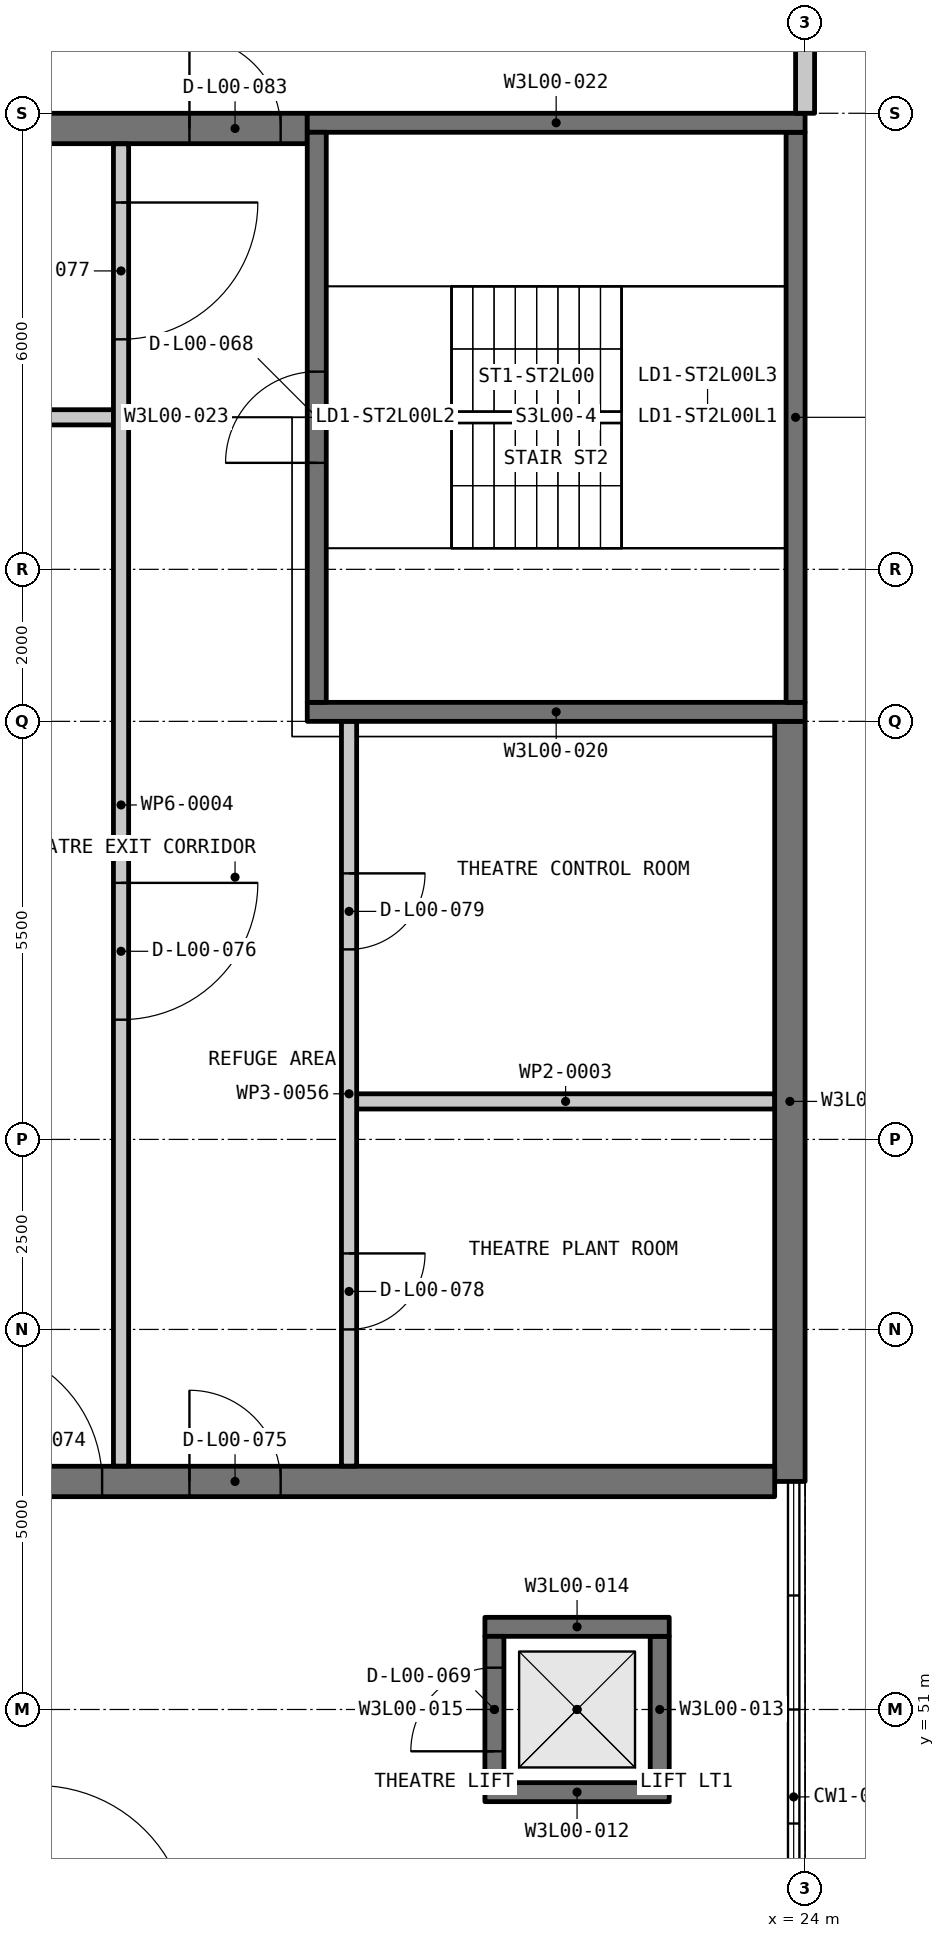
"""IFC4 building model, lengths in metres.
Left out: names, types, materials, properties, quantities, classifications, styles, units other than length and angle.
Written with IfcOpenShell. Run it as: python <this file> out.ifc"""

import sys

from ifc_helpers import new_model, si_unit, direction, frame, frame_2d, origin, place, context, subcontext, project, spatial, rectangle, extrude, element, fill, save


model = new_model("IFC4")
c1 = context("Model", 3, precision=1e-05, world=origin(), true_north=direction((0.0, 1.0)))
c2 = subcontext(c1, "Body", "Model", "MODEL_VIEW")
j1 = project(units=[si_unit("LENGTHUNIT", "METRE"), si_unit("PLANEANGLEUNIT", "RADIAN")], contexts=[c1])
p1 = place(None, origin())
s1 = spatial("IfcSite", under=j1, at=p1, CompositionType="ELEMENT")
p2 = place(p1, origin())
s2 = spatial("IfcBuilding", under=s1, at=p2, CompositionType="ELEMENT")
p3 = place(p2, origin())
s3 = spatial("IfcBuildingStorey", under=s2, at=p3, CompositionType="ELEMENT", Elevation=0.0)
p4 = place(p3, frame((23.8, 54.0, -0.2), z_axis=(0.0, 0.0, 1.0), x_axis=(0.0, 1.0, 0.0)))
e1 = element("IfcWall", 1, at=p4, inside=s3, PredefinedType="SOLIDWALL", context=c2, shape_type="SweptSolid", body=[
    extrude(rectangle(XDim=10.0, YDim=0.4, at=frame_2d((5.0, 0.0))), origin(), (0.0, 0.0, 1.0), 5.9),
])
p5 = place(p3, frame((0.4, 71.8, -0.2), z_axis=(0.0, 0.0, 1.0), x_axis=(1.0, 0.0, 0.0)))
e2 = element("IfcWall", 2, at=p5, inside=s3, PredefinedType="SOLIDWALL", context=c2, shape_type="SweptSolid", body=[
    extrude(rectangle(XDim=17.05, YDim=0.4, at=frame_2d((8.525, 0.0))), origin(), (0.0, 0.0, 1.0), 5.9),
])
p6 = place(p5, frame((15.5, 0.0, 0.2)))
e3 = element("IfcOpeningElement", 3, at=p6, cuts=e2, PredefinedType="OPENING", context=c2, shape_type="SweptSolid", body=[
    extrude(rectangle(XDim=1.2, YDim=2.2, at=frame_2d((0.6, 1.1))), frame((0.0, 0.21, 0.0), z_axis=(0.0, -1.0, 0.0), x_axis=(1.0, 0.0, 0.0)), (0.0, 0.0, 1.0), 0.42),
])
p7 = place(p5, frame((5.7, 0.0, 0.2)))
e4 = element("IfcOpeningElement", 4, at=p7, cuts=e2, PredefinedType="OPENING", context=c2, shape_type="SweptSolid", body=[
    extrude(rectangle(XDim=1.8, YDim=2.2, at=frame_2d((0.9, 1.1))), frame((0.0, 0.21, 0.0), z_axis=(0.0, -1.0, 0.0), x_axis=(1.0, 0.0, 0.0)), (0.0, 0.0, 1.0), 0.42),
])
p8 = place(p3, frame((0.4, 54.0, -0.2), z_axis=(0.0, 0.0, 1.0), x_axis=(1.0, 0.0, 0.0)))
e5 = element("IfcWall", 5, at=p8, inside=s3, PredefinedType="SOLIDWALL", context=c2, shape_type="SweptSolid", body=[
    extrude(rectangle(XDim=23.2, YDim=0.4, at=frame_2d((11.6, 0.0))), origin(), (0.0, 0.0, 1.0), 5.9),
])
p9 = place(p8, frame((9.049, 0.0, 0.2)))
e6 = element("IfcOpeningElement", 6, at=p9, cuts=e5, PredefinedType="OPENING", context=c2, shape_type="SweptSolid", body=[
    extrude(rectangle(XDim=1.8, YDim=2.1, at=frame_2d((0.9, 1.05))), frame((0.0, 0.21, 0.0), z_axis=(0.0, -1.0, 0.0), x_axis=(1.0, 0.0, 0.0)), (0.0, 0.0, 1.0), 0.42),
])
p10 = place(p8, frame((12.551, 0.0, 0.2)))
e7 = element("IfcOpeningElement", 7, at=p10, cuts=e5, PredefinedType="OPENING", context=c2, shape_type="SweptSolid", body=[
    extrude(rectangle(XDim=1.8, YDim=2.1, at=frame_2d((0.9, 1.05))), frame((0.0, 0.21, 0.0), z_axis=(0.0, -1.0, 0.0), x_axis=(1.0, 0.0, 0.0)), (0.0, 0.0, 1.0), 0.42),
])
p11 = place(p8, frame((15.5, 0.0, 0.2)))
e8 = element("IfcOpeningElement", 8, at=p11, cuts=e5, PredefinedType="OPENING", context=c2, shape_type="SweptSolid", body=[
    extrude(rectangle(XDim=1.2, YDim=2.1, at=frame_2d((0.6, 1.05))), frame((0.0, 0.21, 0.0), z_axis=(0.0, -1.0, 0.0), x_axis=(1.0, 0.0, 0.0)), (0.0, 0.0, 1.0), 0.42),
])
p12 = place(p3, frame((19.788, 49.913, -1.4), z_axis=(0.0, 0.0, 1.0), x_axis=(1.0, 0.0, 0.0)))
e9 = element("IfcWall", 9, at=p12, inside=s3, PredefinedType="SHEAR", context=c2, shape_type="SweptSolid", body=[
    extrude(rectangle(XDim=2.425, YDim=0.25, at=frame_2d((1.212, 0.0))), origin(), (0.0, 0.0, 1.0), 7.1),
])
p13 = place(p3, frame((22.087, 50.038, -1.4), z_axis=(0.0, 0.0, 1.0), x_axis=(0.0, 1.0, 0.0)))
e10 = element("IfcWall", 10, at=p13, inside=s3, PredefinedType="SHEAR", context=c2, shape_type="SweptSolid", body=[
    extrude(rectangle(XDim=1.925, YDim=0.25, at=frame_2d((0.962, 0.0))), origin(), (0.0, 0.0, 1.0), 7.1),
])
p14 = place(p3, frame((19.788, 52.087, -1.4), z_axis=(0.0, 0.0, 1.0), x_axis=(1.0, 0.0, 0.0)))
e11 = element("IfcWall", 11, at=p14, inside=s3, PredefinedType="SHEAR", context=c2, shape_type="SweptSolid", body=[
    extrude(rectangle(XDim=2.425, YDim=0.25, at=frame_2d((1.212, 0.0))), origin(), (0.0, 0.0, 1.0), 7.1),
])
p15 = place(p3, frame((19.913, 50.038, -1.4), z_axis=(0.0, 0.0, 1.0), x_axis=(0.0, 1.0, 0.0)))
e12 = element("IfcWall", 12, at=p15, inside=s3, PredefinedType="SHEAR", context=c2, shape_type="SweptSolid", body=[
    extrude(rectangle(XDim=1.925, YDim=0.25, at=frame_2d((0.962, 0.0))), origin(), (0.0, 0.0, 1.0), 7.1),
])
p16 = place(p15, frame((0.413, 0.0, 1.4)))
e13 = element("IfcOpeningElement", 13, at=p16, cuts=e12, PredefinedType="OPENING", context=c2, shape_type="SweptSolid", body=[
    extrude(rectangle(XDim=1.1, YDim=2.1, at=frame_2d((0.55, 1.05))), frame((0.0, 0.135, 0.0), z_axis=(0.0, -1.0, 0.0), x_axis=(1.0, 0.0, 0.0)), (0.0, 0.0, 1.0), 0.27),
])
p17 = place(p3, frame((17.45, 64.125, -0.2), z_axis=(0.0, 0.0, 1.0), x_axis=(1.0, 0.0, 0.0)))
e14 = element("IfcWall", 14, at=p17, inside=s3, PredefinedType="SHEAR", context=c2, shape_type="SweptSolid", body=[
    extrude(rectangle(XDim=6.55, YDim=0.25, at=frame_2d((3.275, 0.0))), origin(), (0.0, 0.0, 1.0), 5.9),
])
p18 = place(p3, frame((23.875, 64.25, -0.2), z_axis=(0.0, 0.0, 1.0), x_axis=(0.0, 1.0, 0.0)))
e15 = element("IfcWall", 15, at=p18, inside=s3, PredefinedType="SHEAR", context=c2, shape_type="SweptSolid", body=[
    extrude(rectangle(XDim=7.5, YDim=0.25, at=frame_2d((3.75, 0.0))), origin(), (0.0, 0.0, 1.0), 5.9),
])
p19 = place(p3, frame((17.45, 71.875, -0.2), z_axis=(0.0, 0.0, 1.0), x_axis=(1.0, 0.0, 0.0)))
e16 = element("IfcWall", 16, at=p19, inside=s3, PredefinedType="SHEAR", context=c2, shape_type="SweptSolid", body=[
    extrude(rectangle(XDim=6.55, YDim=0.25, at=frame_2d((3.275, 0.0))), origin(), (0.0, 0.0, 1.0), 5.9),
])
p20 = place(p3, frame((17.575, 64.25, -0.2), z_axis=(0.0, 0.0, 1.0), x_axis=(0.0, 1.0, 0.0)))
e17 = element("IfcWall", 17, at=p20, inside=s3, PredefinedType="SHEAR", context=c2, shape_type="SweptSolid", body=[
    extrude(rectangle(XDim=7.5, YDim=0.25, at=frame_2d((3.75, 0.0))), origin(), (0.0, 0.0, 1.0), 5.9),
])
p21 = place(p20, frame((3.151, 0.0, 0.2)))
e18 = element("IfcOpeningElement", 18, at=p21, cuts=e17, PredefinedType="OPENING", context=c2, shape_type="SweptSolid", body=[
    extrude(rectangle(XDim=1.2, YDim=2.2, at=frame_2d((0.6, 1.1))), frame((0.0, 0.135, 0.0), z_axis=(0.0, -1.0, 0.0), x_axis=(1.0, 0.0, 0.0)), (0.0, 0.0, 1.0), 0.27),
])
p22 = place(p3, frame((24.0, 72.0, 0.0), z_axis=(0.0, 0.0, 1.0), x_axis=(0.0, 1.0, 0.0)))
e19 = element("IfcWall", 19, at=p22, inside=s3, PredefinedType="SOLIDWALL", context=c2, shape_type="SweptSolid", body=[
    extrude(rectangle(XDim=3.3, YDim=0.25, at=frame_2d((1.65, 0.0))), origin(), (0.0, 0.0, 1.0), 4.5),
])
p23 = place(p3, frame((18.1, 59.0, 0.0), z_axis=(0.0, 0.0, 1.0), x_axis=(1.0, 0.0, 0.0)))
e20 = element("IfcWall", 20, at=p23, inside=s3, PredefinedType="PARTITIONING", context=c2, shape_type="SweptSolid", body=[
    extrude(rectangle(XDim=5.498, YDim=0.2, at=frame_2d((2.749, 0.0))), origin(), (0.0, 0.0, 1.0), 2.374),
])
p24 = place(p3, frame((0.402, 68.0, 0.0), z_axis=(0.0, 0.0, 1.0), x_axis=(1.0, 0.0, 0.0)))
e21 = element("IfcWall", 21, at=p24, inside=s3, PredefinedType="PARTITIONING", context=c2, shape_type="SweptSolid", body=[
    extrude(rectangle(XDim=14.498, YDim=0.2, at=frame_2d((7.249, 0.0))), origin(), (0.0, 0.0, 1.0), 12.738),
])
p25 = place(p24, frame((6.598, 0.0, 0.0)))
e22 = element("IfcOpeningElement", 22, at=p25, cuts=e21, PredefinedType="OPENING", context=c2, shape_type="SweptSolid", body=[
    extrude(rectangle(XDim=1.2, YDim=2.1, at=frame_2d((0.6, 1.05))), frame((0.0, 0.11, 0.0), z_axis=(0.0, -1.0, 0.0), x_axis=(1.0, 0.0, 0.0)), (0.0, 0.0, 1.0), 0.22),
])
p26 = place(p3, frame((18.0, 63.998, 0.0), z_axis=(0.0, 0.0, 1.0), x_axis=(0.0, -1.0, 0.0)))
e23 = element("IfcWall", 23, at=p26, inside=s3, PredefinedType="PARTITIONING", context=c2, shape_type="SweptSolid", body=[
    extrude(rectangle(XDim=9.796, YDim=0.2, at=frame_2d((4.898, 0.0))), origin(), (0.0, 0.0, 1.0), 11.05),
])
p27 = place(p26, frame((6.998, 0.0, 0.0)))
e24 = element("IfcOpeningElement", 24, at=p27, cuts=e23, PredefinedType="OPENING", context=c2, shape_type="SweptSolid", body=[
    extrude(rectangle(XDim=1.0, YDim=2.1, at=frame_2d((0.5, 1.05))), frame((0.0, 0.11, 0.0), z_axis=(0.0, -1.0, 0.0), x_axis=(1.0, 0.0, 0.0)), (0.0, 0.0, 1.0), 0.22),
])
p28 = place(p26, frame((1.998, 0.0, 0.0)))
e25 = element("IfcOpeningElement", 25, at=p28, cuts=e23, PredefinedType="OPENING", context=c2, shape_type="SweptSolid", body=[
    extrude(rectangle(XDim=1.0, YDim=2.1, at=frame_2d((0.5, 1.05))), frame((0.0, 0.11, 0.0), z_axis=(0.0, -1.0, 0.0), x_axis=(1.0, 0.0, 0.0)), (0.0, 0.0, 1.0), 0.22),
])
p29 = place(p3, frame((15.0, 71.598, 0.0), z_axis=(0.0, 0.0, 1.0), x_axis=(0.0, -1.0, 0.0)))
e26 = element("IfcWall", 26, at=p29, inside=s3, PredefinedType="PARTITIONING", context=c2, shape_type="SweptSolid", body=[
    extrude(rectangle(XDim=17.396, YDim=0.2, at=frame_2d((8.698, 0.0))), origin(), (0.0, 0.0, 1.0), 12.175),
])
p30 = place(p29, frame((9.723, 0.0, 0.0)))
e27 = element("IfcOpeningElement", 27, at=p30, cuts=e26, PredefinedType="OPENING", context=c2, shape_type="SweptSolid", body=[
    extrude(rectangle(XDim=1.8, YDim=2.1, at=frame_2d((0.9, 1.05))), frame((0.0, 0.11, 0.0), z_axis=(0.0, -1.0, 0.0), x_axis=(1.0, 0.0, 0.0)), (0.0, 0.0, 1.0), 0.22),
])
p31 = place(p29, frame((0.772, 0.0, 0.0)))
e28 = element("IfcOpeningElement", 28, at=p31, cuts=e26, PredefinedType="OPENING", context=c2, shape_type="SweptSolid", body=[
    extrude(rectangle(XDim=1.8, YDim=2.1, at=frame_2d((0.9, 1.05))), frame((0.0, 0.11, 0.0), z_axis=(0.0, -1.0, 0.0), x_axis=(1.0, 0.0, 0.0)), (0.0, 0.0, 1.0), 0.22),
])
p32 = place(p6, origin())
e29 = element("IfcDoor", 29, at=p32, inside=s3, OperationType="SINGLE_SWING_LEFT", PredefinedType="DOOR", context=c2, shape_type="SweptSolid", body=[
    extrude(rectangle(XDim=1.2, YDim=2.2, at=frame_2d((0.6, 1.1))), frame((0.0, 0.025, 0.0), z_axis=(0.0, -1.0, 0.0), x_axis=(1.0, 0.0, 0.0)), (0.0, 0.0, 1.0), 0.05),
])
fill(e3, e29)
p33 = place(p21, origin())
e30 = element("IfcDoor", 30, at=p33, inside=s3, OperationType="SINGLE_SWING_RIGHT", PredefinedType="DOOR", context=c2, shape_type="SweptSolid", body=[
    extrude(rectangle(XDim=1.2, YDim=2.2, at=frame_2d((0.6, 1.1))), frame((0.0, 0.025, 0.0), z_axis=(0.0, -1.0, 0.0), x_axis=(1.0, 0.0, 0.0)), (0.0, 0.0, 1.0), 0.05),
])
fill(e18, e30)
p34 = place(p16, origin())
e31 = element("IfcDoor", 31, at=p34, inside=s3, OperationType="DOUBLE_DOOR_SLIDING", PredefinedType="DOOR", context=c2, shape_type="SweptSolid", body=[
    extrude(rectangle(XDim=1.1, YDim=2.1, at=frame_2d((0.55, 1.05))), frame((0.0, 0.025, 0.0), z_axis=(0.0, -1.0, 0.0), x_axis=(1.0, 0.0, 0.0)), (0.0, 0.0, 1.0), 0.05),
])
fill(e13, e31)
p35 = place(p10, origin())
e32 = element("IfcDoor", 32, at=p35, inside=s3, OperationType="DOUBLE_DOOR_SINGLE_SWING", PredefinedType="DOOR", context=c2, shape_type="SweptSolid", body=[
    extrude(rectangle(XDim=1.8, YDim=2.1, at=frame_2d((0.9, 1.05))), frame((0.0, 0.025, 0.0), z_axis=(0.0, -1.0, 0.0), x_axis=(1.0, 0.0, 0.0)), (0.0, 0.0, 1.0), 0.05),
])
fill(e7, e32)
p36 = place(p11, origin())
e33 = element("IfcDoor", 33, at=p36, inside=s3, OperationType="SINGLE_SWING_LEFT", PredefinedType="DOOR", context=c2, shape_type="SweptSolid", body=[
    extrude(rectangle(XDim=1.2, YDim=2.1, at=frame_2d((0.6, 1.05))), frame((0.0, 0.025, 0.0), z_axis=(0.0, -1.0, 0.0), x_axis=(1.0, 0.0, 0.0)), (0.0, 0.0, 1.0), 0.05),
])
fill(e8, e33)
p37 = place(p30, origin())
e34 = element("IfcDoor", 34, at=p37, inside=s3, OperationType="DOUBLE_DOOR_SINGLE_SWING", PredefinedType="DOOR", context=c2, shape_type="SweptSolid", body=[
    extrude(rectangle(XDim=1.8, YDim=2.1, at=frame_2d((0.9, 1.05))), frame((0.0, 0.025, 0.0), z_axis=(0.0, -1.0, 0.0), x_axis=(1.0, 0.0, 0.0)), (0.0, 0.0, 1.0), 0.05),
])
fill(e27, e34)
p38 = place(p31, origin())
e35 = element("IfcDoor", 35, at=p38, inside=s3, OperationType="DOUBLE_DOOR_SINGLE_SWING", PredefinedType="DOOR", context=c2, shape_type="SweptSolid", body=[
    extrude(rectangle(XDim=1.8, YDim=2.1, at=frame_2d((0.9, 1.05))), frame((0.0, 0.025, 0.0), z_axis=(0.0, -1.0, 0.0), x_axis=(1.0, 0.0, 0.0)), (0.0, 0.0, 1.0), 0.05),
])
fill(e28, e35)
p39 = place(p27, origin())
e36 = element("IfcDoor", 36, at=p39, inside=s3, OperationType="SINGLE_SWING_LEFT", PredefinedType="DOOR", context=c2, shape_type="SweptSolid", body=[
    extrude(rectangle(XDim=1.0, YDim=2.1, at=frame_2d((0.5, 1.05))), frame((0.0, 0.025, 0.0), z_axis=(0.0, -1.0, 0.0), x_axis=(1.0, 0.0, 0.0)), (0.0, 0.0, 1.0), 0.05),
])
fill(e24, e36)
p40 = place(p28, origin())
e37 = element("IfcDoor", 37, at=p40, inside=s3, OperationType="SINGLE_SWING_RIGHT", PredefinedType="DOOR", context=c2, shape_type="SweptSolid", body=[
    extrude(rectangle(XDim=1.0, YDim=2.1, at=frame_2d((0.5, 1.05))), frame((0.0, 0.025, 0.0), z_axis=(0.0, -1.0, 0.0), x_axis=(1.0, 0.0, 0.0)), (0.0, 0.0, 1.0), 0.05),
])
fill(e25, e37)
save(model, sys.argv[1])
